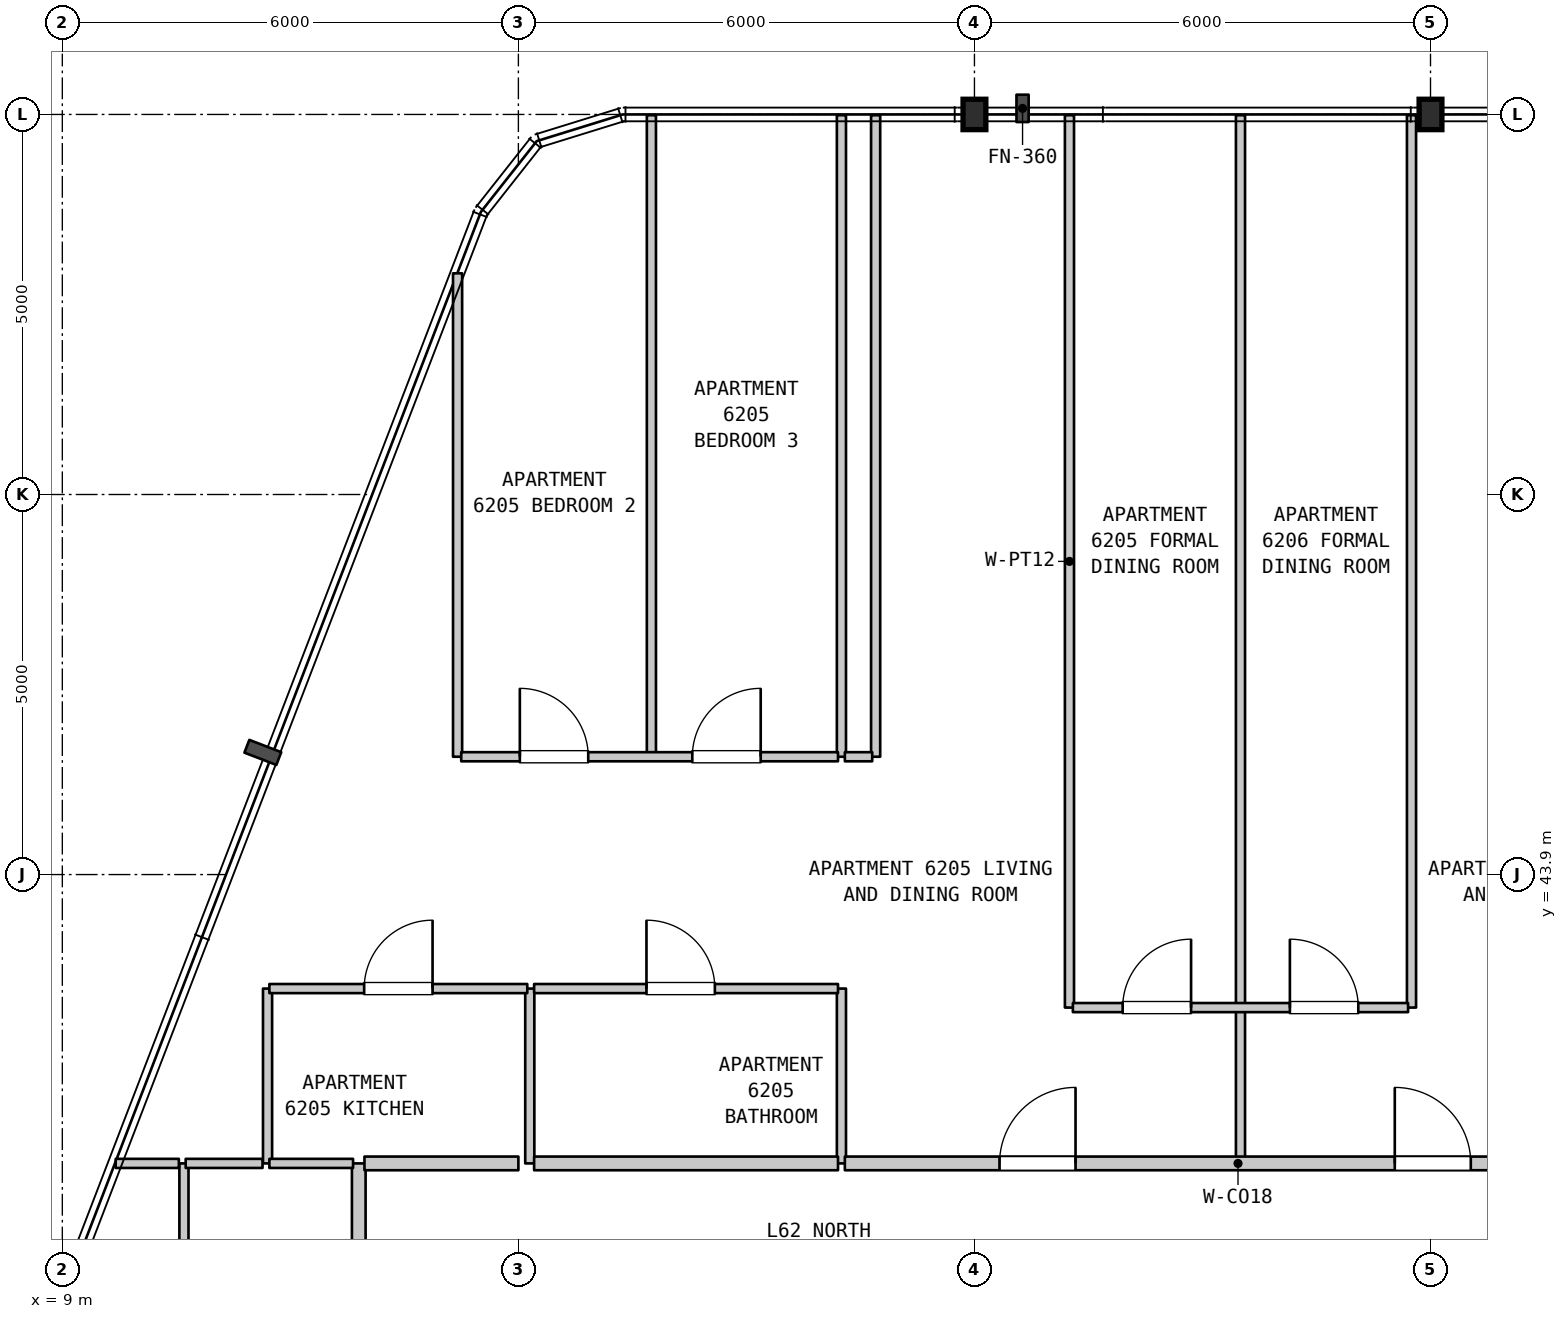
"""IFC4 building model, lengths in metres.
Left out: names, types, materials, properties, quantities, classifications, styles, units other than length and angle.
Written with IfcOpenShell. Run it as: python <this file> out.ifc"""

import sys

from ifc_helpers import new_model, si_unit, direction, frame, frame_2d, origin, origin_2d, place, context, subcontext, project, spatial, rectangle, i_section, extrude, element, fill, save


model = new_model("IFC4")
c1 = context("Model", 3, precision=1e-05, world=origin(), true_north=direction((0.0, 1.0)))
c2 = subcontext(c1, "Body", "Model", "MODEL_VIEW")
j1 = project(units=[si_unit("LENGTHUNIT", "METRE"), si_unit("PLANEANGLEUNIT", "RADIAN")], contexts=[c1])
p1 = place(None, origin())
s1 = spatial("IfcSite", under=j1, at=p1, CompositionType="ELEMENT")
p2 = place(p1, origin())
s2 = spatial("IfcBuilding", under=s1, at=p2, CompositionType="ELEMENT")
p3 = place(p2, frame((0.0, 0.0, 251.0)))
s3 = spatial("IfcBuildingStorey", under=s2, at=p3, CompositionType="ELEMENT", Elevation=251.0)
for number, where, z_axis, x_axis in (
    (1, (21.0, 53.9, 0.0), (0.0, 0.0, 1.0), (1.0, 0.0, 0.0)),
    (2, (27.0, 53.9, 0.0), (0.0, 0.0, 1.0), (1.0, 0.0, 0.0)),
):
    element("IfcColumn", number, at=place(p3, frame(where, z_axis=z_axis, x_axis=x_axis)), inside=s3, PredefinedType="COLUMN", context=c2, shape_type="SweptSolid", body=[
        extrude(i_section(OverallWidth=0.3, OverallDepth=0.4, WebThickness=0.013, FlangeThickness=0.024, FilletRadius=0.027, at=origin_2d()), origin(), (0.0, 0.0, 1.0), 3.7),
    ])
p4 = place(p3, frame((10.6, 31.5, 0.0), z_axis=(0.0, 0.0, 1.0), x_axis=(0.0, 1.0, 0.0)))
e3 = element("IfcWall", 3, at=p4, inside=s3, PredefinedType="PARTITIONING", context=c2, shape_type="SweptSolid", body=[
    extrude(rectangle(XDim=8.6, YDim=0.12, at=frame_2d((4.3, 0.0))), origin(), (0.0, 0.0, 1.0), 3.39),
])
p5 = place(p3, frame((11.7, 40.1, 0.0), z_axis=(0.0, 0.0, 1.0), x_axis=(0.0, 1.0, 0.0)))
e4 = element("IfcWall", 4, at=p5, inside=s3, PredefinedType="PARTITIONING", context=c2, shape_type="SweptSolid", body=[
    extrude(rectangle(XDim=2.3, YDim=0.12, at=frame_2d((1.15, 0.0))), origin(), (0.0, 0.0, 1.0), 3.39),
])
p6 = place(p3, frame((12.9, 31.5, 0.0), z_axis=(0.0, 0.0, 1.0), x_axis=(0.0, 1.0, 0.0)))
e5 = element("IfcWall", 5, at=p6, inside=s3, PredefinedType="STANDARD", context=c2, shape_type="SweptSolid", body=[
    extrude(rectangle(XDim=8.6, YDim=0.18, at=frame_2d((4.3, 0.0))), origin(), (0.0, 0.0, 1.0), 3.39),
])
p7 = place(p3, frame((14.2, 45.45, 0.0), z_axis=(0.0, 0.0, 1.0), x_axis=(0.0, 1.0, 0.0)))
e6 = element("IfcWall", 6, at=p7, inside=s3, PredefinedType="PARTITIONING", context=c2, shape_type="SweptSolid", body=[
    extrude(rectangle(XDim=6.36, YDim=0.12, at=frame_2d((3.18, 0.0))), origin(), (0.0, 0.0, 1.0), 3.39),
])
p8 = place(p3, frame((15.15, 40.1, 0.0), z_axis=(0.0, 0.0, 1.0), x_axis=(0.0, 1.0, 0.0)))
e7 = element("IfcWall", 7, at=p8, inside=s3, PredefinedType="PARTITIONING", context=c2, shape_type="SweptSolid", body=[
    extrude(rectangle(XDim=2.3, YDim=0.12, at=frame_2d((1.15, 0.0))), origin(), (0.0, 0.0, 1.0), 3.39),
])
p9 = place(p3, frame((16.75, 45.45, 0.0), z_axis=(0.0, 0.0, 1.0), x_axis=(0.0, 1.0, 0.0)))
e8 = element("IfcWall", 8, at=p9, inside=s3, PredefinedType="PARTITIONING", context=c2, shape_type="SweptSolid", body=[
    extrude(rectangle(XDim=8.44, YDim=0.12, at=frame_2d((4.22, 0.0))), origin(), (0.0, 0.0, 1.0), 3.39),
])
p10 = place(p3, frame((19.25, 40.1, 0.0), z_axis=(0.0, 0.0, 1.0), x_axis=(0.0, 1.0, 0.0)))
e9 = element("IfcWall", 9, at=p10, inside=s3, PredefinedType="PARTITIONING", context=c2, shape_type="SweptSolid", body=[
    extrude(rectangle(XDim=2.3, YDim=0.12, at=frame_2d((1.15, 0.0))), origin(), (0.0, 0.0, 1.0), 3.39),
])
for number, where, z_axis, x_axis in (
    (10, (19.25, 45.45, 0.0), (0.0, 0.0, 1.0), (0.0, 1.0, 0.0)),
    (11, (19.7, 45.45, 0.0), (0.0, 0.0, 1.0), (0.0, 1.0, 0.0)),
):
    element("IfcWall", number, at=place(p3, frame(where, z_axis=z_axis, x_axis=x_axis)), inside=s3, PredefinedType="PARTITIONING", context=c2, shape_type="SweptSolid", body=[
        extrude(rectangle(XDim=8.44, YDim=0.12, at=frame_2d((4.22, 0.0))), origin(), (0.0, 0.0, 1.0), 3.39),
    ])
p11 = place(p3, frame((22.25, 42.15, 0.0), z_axis=(0.0, 0.0, 1.0), x_axis=(0.0, 1.0, 0.0)))
e12 = element("IfcWall", 12, at=p11, inside=s3, PredefinedType="PARTITIONING", context=c2, shape_type="SweptSolid", body=[
    extrude(rectangle(XDim=11.74, YDim=0.12, at=frame_2d((5.87, 0.0))), origin(), (0.0, 0.0, 1.0), 3.39),
])
p12 = place(p3, frame((24.5, 40.1, 0.0), z_axis=(0.0, 0.0, 1.0), x_axis=(0.0, 1.0, 0.0)))
e13 = element("IfcWall", 13, at=p12, inside=s3, PredefinedType="PARTITIONING", context=c2, shape_type="SweptSolid", body=[
    extrude(rectangle(XDim=2.05, YDim=0.12, at=frame_2d((1.025, 0.0))), origin(), (0.0, 0.0, 1.0), 3.39),
])
for number, where, z_axis, x_axis in (
    (14, (24.5, 42.15, 0.0), (0.0, 0.0, 1.0), (0.0, 1.0, 0.0)),
    (15, (26.75, 42.15, 0.0), (0.0, 0.0, 1.0), (0.0, 1.0, 0.0)),
):
    element("IfcWall", number, at=place(p3, frame(where, z_axis=z_axis, x_axis=x_axis)), inside=s3, PredefinedType="PARTITIONING", context=c2, shape_type="SweptSolid", body=[
        extrude(rectangle(XDim=11.74, YDim=0.12, at=frame_2d((5.87, 0.0))), origin(), (0.0, 0.0, 1.0), 3.39),
    ])
p13 = place(p3, frame((9.702, 40.1, 0.0), z_axis=(0.0, 0.0, 1.0), x_axis=(1.0, 0.0, 0.0)))
e16 = element("IfcWall", 16, at=p13, inside=s3, PredefinedType="PARTITIONING", context=c2, shape_type="SweptSolid", body=[
    extrude(rectangle(XDim=0.831, YDim=0.12, at=frame_2d((0.416, 0.0))), origin(), (0.0, 0.0, 1.0), 3.39),
])
p14 = place(p3, frame((10.623, 40.1, 0.0), z_axis=(0.0, 0.0, 1.0), x_axis=(1.0, 0.0, 0.0)))
e17 = element("IfcWall", 17, at=p14, inside=s3, PredefinedType="PARTITIONING", context=c2, shape_type="SweptSolid", body=[
    extrude(rectangle(XDim=1.011, YDim=0.12, at=frame_2d((0.505, 0.0))), origin(), (0.0, 0.0, 1.0), 3.39),
])
p15 = place(p3, frame((11.724, 40.1, 0.0), z_axis=(0.0, 0.0, 1.0), x_axis=(1.0, 0.0, 0.0)))
e18 = element("IfcWall", 18, at=p15, inside=s3, PredefinedType="PARTITIONING", context=c2, shape_type="SweptSolid", body=[
    extrude(rectangle(XDim=1.101, YDim=0.12, at=frame_2d((0.55, 0.0))), origin(), (0.0, 0.0, 1.0), 3.39),
])
p16 = place(p3, frame((12.975, 40.1, 0.0), z_axis=(0.0, 0.0, 1.0), x_axis=(1.0, 0.0, 0.0)))
e19 = element("IfcWall", 19, at=p16, inside=s3, PredefinedType="STANDARD", context=c2, shape_type="SweptSolid", body=[
    extrude(rectangle(XDim=2.025, YDim=0.18, at=frame_2d((1.012, 0.0))), origin(), (0.0, 0.0, 1.0), 3.39),
])
p17 = place(p3, frame((15.207, 40.1, 0.0), z_axis=(0.0, 0.0, 1.0), x_axis=(1.0, 0.0, 0.0)))
e20 = element("IfcWall", 20, at=p17, inside=s3, PredefinedType="STANDARD", context=c2, shape_type="SweptSolid", body=[
    extrude(rectangle(XDim=3.998, YDim=0.18, at=frame_2d((1.999, 0.0))), origin(), (0.0, 0.0, 1.0), 3.39),
])
p18 = place(p3, frame((19.295, 40.1, 0.0), z_axis=(0.0, 0.0, 1.0), x_axis=(1.0, 0.0, 0.0)))
e21 = element("IfcWall", 21, at=p18, inside=s3, PredefinedType="STANDARD", context=c2, shape_type="SweptSolid", body=[
    extrude(rectangle(XDim=10.345, YDim=0.18, at=frame_2d((5.172, 0.0))), origin(), (0.0, 0.0, 1.0), 3.39),
])
p19 = place(p18, frame((2.035, 0.0, 0.0)))
e22 = element("IfcOpeningElement", 22, at=p19, cuts=e21, PredefinedType="OPENING", context=c2, shape_type="SweptSolid", body=[
    extrude(rectangle(XDim=1.0, YDim=2.15, at=frame_2d((0.5, 1.075))), frame((0.0, 0.1, 0.0), z_axis=(0.0, -1.0, 0.0), x_axis=(1.0, 0.0, 0.0)), (0.0, 0.0, 1.0), 0.2),
])
p20 = place(p18, frame((7.235, 0.0, 0.0)))
e23 = element("IfcOpeningElement", 23, at=p20, cuts=e21, PredefinedType="OPENING", context=c2, shape_type="SweptSolid", body=[
    extrude(rectangle(XDim=1.0, YDim=2.15, at=frame_2d((0.5, 1.075))), frame((0.0, 0.1, 0.0), z_axis=(0.0, -1.0, 0.0), x_axis=(1.0, 0.0, 0.0)), (0.0, 0.0, 1.0), 0.2),
])
p21 = place(p3, frame((22.295, 42.15, 0.0), z_axis=(0.0, 0.0, 1.0), x_axis=(1.0, 0.0, 0.0)))
e24 = element("IfcWall", 24, at=p21, inside=s3, PredefinedType="PARTITIONING", context=c2, shape_type="SweptSolid", body=[
    extrude(rectangle(XDim=4.41, YDim=0.12, at=frame_2d((2.205, 0.0))), origin(), (0.0, 0.0, 1.0), 3.39),
])
p22 = place(p21, frame((0.655, 0.0, 0.0)))
e25 = element("IfcOpeningElement", 25, at=p22, cuts=e24, PredefinedType="OPENING", context=c2, shape_type="SweptSolid", body=[
    extrude(rectangle(XDim=0.9, YDim=2.15, at=frame_2d((0.45, 1.075))), frame((0.0, 0.07, 0.0), z_axis=(0.0, -1.0, 0.0), x_axis=(1.0, 0.0, 0.0)), (0.0, 0.0, 1.0), 0.14),
])
p23 = place(p21, frame((2.855, 0.0, 0.0)))
e26 = element("IfcOpeningElement", 26, at=p23, cuts=e24, PredefinedType="OPENING", context=c2, shape_type="SweptSolid", body=[
    extrude(rectangle(XDim=0.9, YDim=2.15, at=frame_2d((0.45, 1.075))), frame((0.0, 0.07, 0.0), z_axis=(0.0, -1.0, 0.0), x_axis=(1.0, 0.0, 0.0)), (0.0, 0.0, 1.0), 0.14),
])
p24 = place(p3, frame((11.724, 42.4, 0.0), z_axis=(0.0, 0.0, 1.0), x_axis=(1.0, 0.0, 0.0)))
e27 = element("IfcWall", 27, at=p24, inside=s3, PredefinedType="PARTITIONING", context=c2, shape_type="SweptSolid", body=[
    extrude(rectangle(XDim=3.393, YDim=0.12, at=frame_2d((1.696, 0.0))), origin(), (0.0, 0.0, 1.0), 3.39),
])
p25 = place(p24, frame((1.247, 0.0, 0.0)))
e28 = element("IfcOpeningElement", 28, at=p25, cuts=e27, PredefinedType="OPENING", context=c2, shape_type="SweptSolid", body=[
    extrude(rectangle(XDim=0.9, YDim=2.15, at=frame_2d((0.45, 1.075))), frame((0.0, 0.07, 0.0), z_axis=(0.0, -1.0, 0.0), x_axis=(1.0, 0.0, 0.0)), (0.0, 0.0, 1.0), 0.14),
])
p26 = place(p3, frame((15.207, 42.4, 0.0), z_axis=(0.0, 0.0, 1.0), x_axis=(1.0, 0.0, 0.0)))
e29 = element("IfcWall", 29, at=p26, inside=s3, PredefinedType="PARTITIONING", context=c2, shape_type="SweptSolid", body=[
    extrude(rectangle(XDim=3.998, YDim=0.12, at=frame_2d((1.999, 0.0))), origin(), (0.0, 0.0, 1.0), 3.39),
])
p27 = place(p26, frame((1.478, 0.0, 0.0)))
e30 = element("IfcOpeningElement", 30, at=p27, cuts=e29, PredefinedType="OPENING", context=c2, shape_type="SweptSolid", body=[
    extrude(rectangle(XDim=0.9, YDim=2.1, at=frame_2d((0.45, 1.05))), frame((0.0, 0.07, 0.0), z_axis=(0.0, -1.0, 0.0), x_axis=(1.0, 0.0, 0.0)), (0.0, 0.0, 1.0), 0.14),
])
p28 = place(p3, frame((14.248, 45.45, 0.0), z_axis=(0.0, 0.0, 1.0), x_axis=(1.0, 0.0, 0.0)))
e31 = element("IfcWall", 31, at=p28, inside=s3, PredefinedType="PARTITIONING", context=c2, shape_type="SweptSolid", body=[
    extrude(rectangle(XDim=4.957, YDim=0.12, at=frame_2d((2.479, 0.0))), origin(), (0.0, 0.0, 1.0), 3.39),
])
p29 = place(p28, frame((0.771, 0.0, 0.0)))
e32 = element("IfcOpeningElement", 32, at=p29, cuts=e31, PredefinedType="OPENING", context=c2, shape_type="SweptSolid", body=[
    extrude(rectangle(XDim=0.9, YDim=2.15, at=frame_2d((0.45, 1.075))), frame((0.0, 0.07, 0.0), z_axis=(0.0, -1.0, 0.0), x_axis=(1.0, 0.0, 0.0)), (0.0, 0.0, 1.0), 0.14),
])
p30 = place(p28, frame((3.04, 0.0, 0.0)))
e33 = element("IfcOpeningElement", 33, at=p30, cuts=e31, PredefinedType="OPENING", context=c2, shape_type="SweptSolid", body=[
    extrude(rectangle(XDim=0.9, YDim=2.15, at=frame_2d((0.45, 1.075))), frame((0.0, 0.07, 0.0), z_axis=(0.0, -1.0, 0.0), x_axis=(1.0, 0.0, 0.0)), (0.0, 0.0, 1.0), 0.14),
])
p31 = place(p3, frame((19.295, 45.45, 0.0), z_axis=(0.0, 0.0, 1.0), x_axis=(1.0, 0.0, 0.0)))
e34 = element("IfcWall", 34, at=p31, inside=s3, PredefinedType="PARTITIONING", context=c2, shape_type="SweptSolid", body=[
    extrude(rectangle(XDim=0.36, YDim=0.12, at=frame_2d((0.18, 0.0))), origin(), (0.0, 0.0, 1.0), 3.39),
])
p32 = place(p19, origin())
e35 = element("IfcDoor", 35, at=p32, inside=s3, OperationType="SINGLE_SWING_RIGHT", PredefinedType="DOOR", context=c2, shape_type="SweptSolid", body=[
    extrude(rectangle(XDim=1.0, YDim=2.15, at=frame_2d((0.5, 1.075))), frame((0.0, 0.025, 0.0), z_axis=(0.0, -1.0, 0.0), x_axis=(1.0, 0.0, 0.0)), (0.0, 0.0, 1.0), 0.05),
])
fill(e22, e35)
p33 = place(p20, origin())
e36 = element("IfcDoor", 36, at=p33, inside=s3, OperationType="SINGLE_SWING_LEFT", PredefinedType="DOOR", context=c2, shape_type="SweptSolid", body=[
    extrude(rectangle(XDim=1.0, YDim=2.15, at=frame_2d((0.5, 1.075))), frame((0.0, 0.025, 0.0), z_axis=(0.0, -1.0, 0.0), x_axis=(1.0, 0.0, 0.0)), (0.0, 0.0, 1.0), 0.05),
])
fill(e23, e36)
p34 = place(p22, origin())
e37 = element("IfcDoor", 37, at=p34, inside=s3, OperationType="SINGLE_SWING_RIGHT", PredefinedType="DOOR", context=c2, shape_type="SweptSolid", body=[
    extrude(rectangle(XDim=0.9, YDim=2.15, at=frame_2d((0.45, 1.075))), frame((0.0, 0.025, 0.0), z_axis=(0.0, -1.0, 0.0), x_axis=(1.0, 0.0, 0.0)), (0.0, 0.0, 1.0), 0.05),
])
fill(e25, e37)
p35 = place(p23, origin())
e38 = element("IfcDoor", 38, at=p35, inside=s3, OperationType="SINGLE_SWING_LEFT", PredefinedType="DOOR", context=c2, shape_type="SweptSolid", body=[
    extrude(rectangle(XDim=0.9, YDim=2.15, at=frame_2d((0.45, 1.075))), frame((0.0, 0.025, 0.0), z_axis=(0.0, -1.0, 0.0), x_axis=(1.0, 0.0, 0.0)), (0.0, 0.0, 1.0), 0.05),
])
fill(e26, e38)
p36 = place(p25, origin())
e39 = element("IfcDoor", 39, at=p36, inside=s3, OperationType="SINGLE_SWING_RIGHT", PredefinedType="DOOR", context=c2, shape_type="SweptSolid", body=[
    extrude(rectangle(XDim=0.9, YDim=2.15, at=frame_2d((0.45, 1.075))), frame((0.0, 0.025, 0.0), z_axis=(0.0, -1.0, 0.0), x_axis=(1.0, 0.0, 0.0)), (0.0, 0.0, 1.0), 0.05),
])
fill(e28, e39)
p37 = place(p27, origin())
e40 = element("IfcDoor", 40, at=p37, inside=s3, OperationType="SINGLE_SWING_LEFT", PredefinedType="DOOR", context=c2, shape_type="SweptSolid", body=[
    extrude(rectangle(XDim=0.9, YDim=2.1, at=frame_2d((0.45, 1.05))), frame((0.0, 0.025, 0.0), z_axis=(0.0, -1.0, 0.0), x_axis=(1.0, 0.0, 0.0)), (0.0, 0.0, 1.0), 0.05),
])
fill(e30, e40)
p38 = place(p29, origin())
e41 = element("IfcDoor", 41, at=p38, inside=s3, OperationType="SINGLE_SWING_LEFT", PredefinedType="DOOR", context=c2, shape_type="SweptSolid", body=[
    extrude(rectangle(XDim=0.9, YDim=2.15, at=frame_2d((0.45, 1.075))), frame((0.0, 0.025, 0.0), z_axis=(0.0, -1.0, 0.0), x_axis=(1.0, 0.0, 0.0)), (0.0, 0.0, 1.0), 0.05),
])
fill(e32, e41)
p39 = place(p30, origin())
e42 = element("IfcDoor", 42, at=p39, inside=s3, OperationType="SINGLE_SWING_RIGHT", PredefinedType="DOOR", context=c2, shape_type="SweptSolid", body=[
    extrude(rectangle(XDim=0.9, YDim=2.15, at=frame_2d((0.45, 1.075))), frame((0.0, 0.025, 0.0), z_axis=(0.0, -1.0, 0.0), x_axis=(1.0, 0.0, 0.0)), (0.0, 0.0, 1.0), 0.05),
])
fill(e33, e42)
save(model, sys.argv[1])
